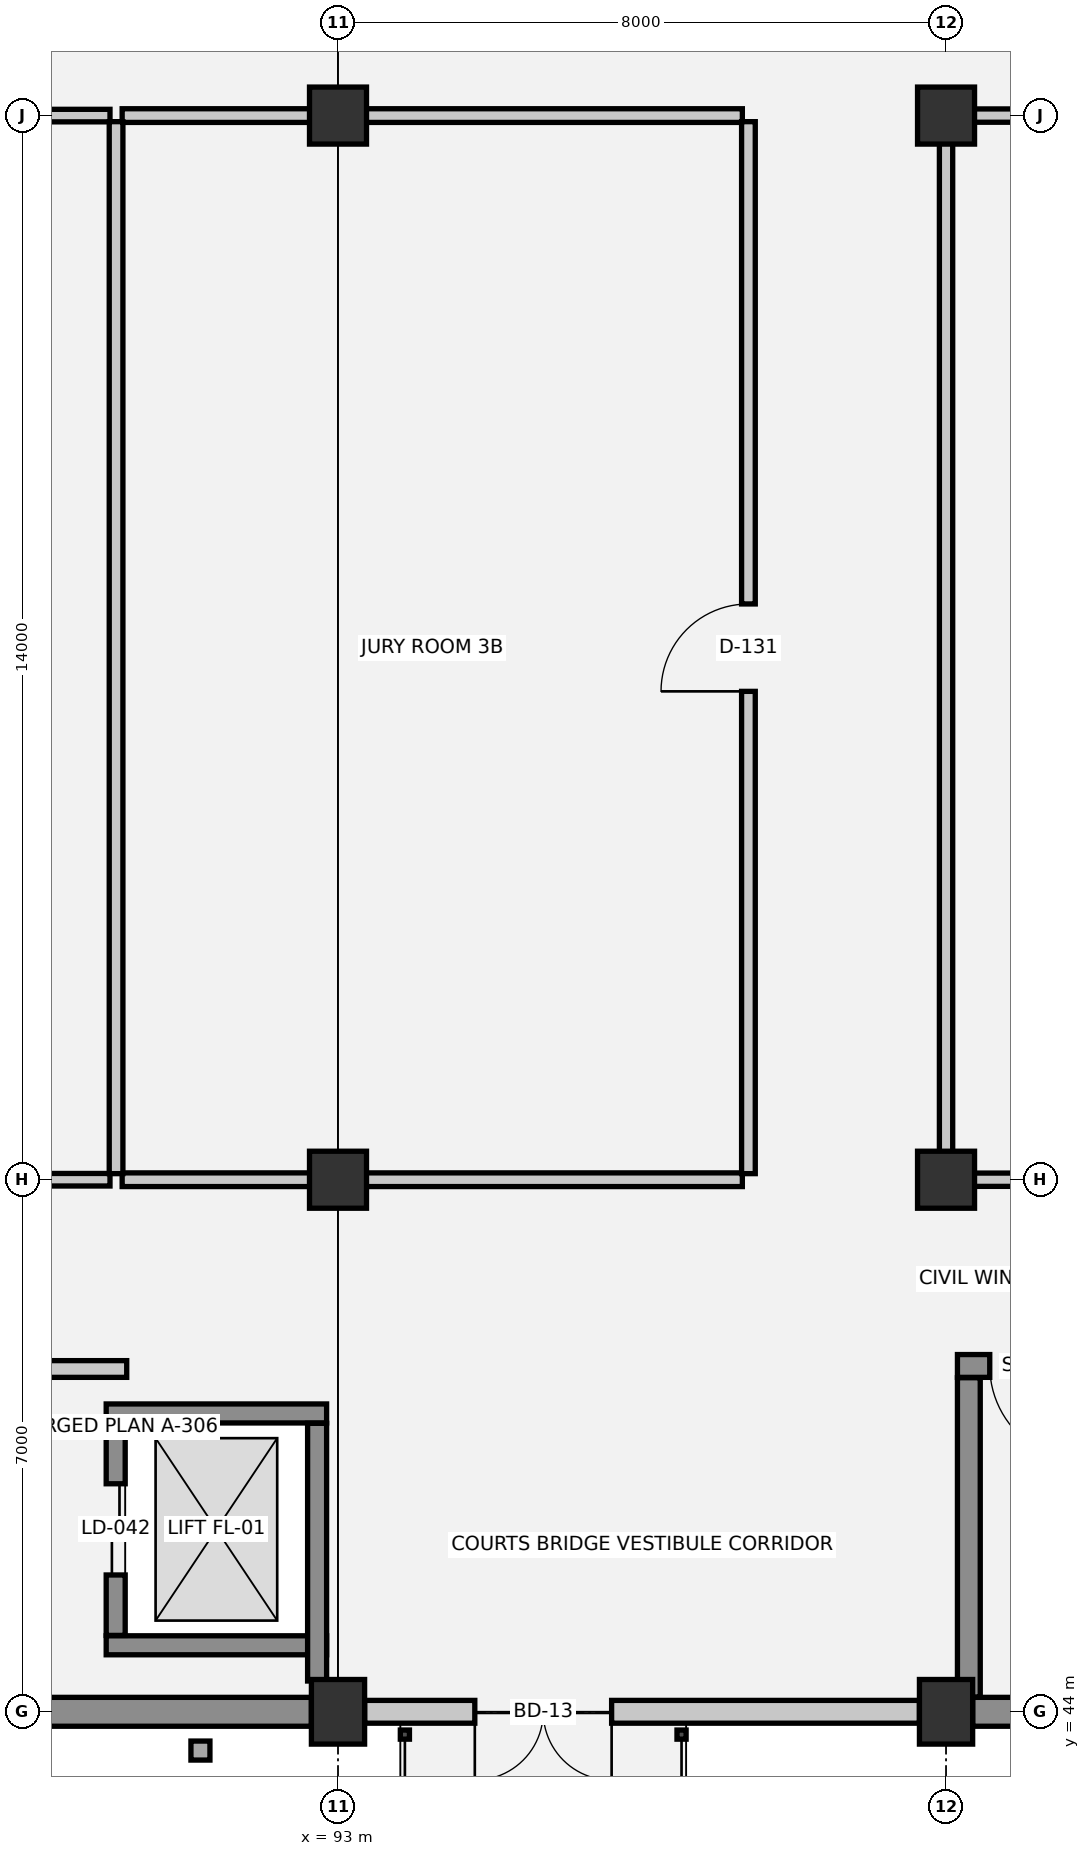
"""IFC4 building model, lengths in metres.
Left out: names, types, materials, properties, quantities, classifications, styles, units other than length and angle.
Written with IfcOpenShell. Run it as: python <this file> out.ifc"""

import sys

from ifc_helpers import new_model, si_unit, direction, frame, frame_2d, origin, origin_2d, place, context, subcontext, project, spatial, rectangle, extrude, element, fill, save


model = new_model("IFC4")
c1 = context("Model", 3, precision=1e-05, world=origin(), true_north=direction((0.0, 1.0)))
c2 = subcontext(c1, "Body", "Model", "MODEL_VIEW")
j1 = project(units=[si_unit("LENGTHUNIT", "METRE"), si_unit("PLANEANGLEUNIT", "RADIAN")], contexts=[c1])
p1 = place(None, origin())
s1 = spatial("IfcSite", under=j1, at=p1, CompositionType="ELEMENT")
p2 = place(p1, origin())
s2 = spatial("IfcBuilding", under=s1, at=p2, CompositionType="ELEMENT")
p3 = place(p2, frame((0.0, 0.0, 9.9)))
s3 = spatial("IfcBuildingStorey", under=s2, at=p3, CompositionType="ELEMENT", Elevation=9.9)
p4 = place(p3, frame((93.0, 44.0, 0.0), z_axis=(0.0, 0.0, 1.0), x_axis=(1.0, 0.0, 0.0)))
e1 = element("IfcColumn", 1, at=p4, inside=s3, PredefinedType="COLUMN", context=c2, shape_type="SweptSolid", body=[
    extrude(rectangle(XDim=0.7, YDim=0.85, at=origin_2d()), origin(), (0.0, 0.0, 1.0), 4.5),
])
for number, where, z_axis, x_axis in (
    (2, (93.0, 51.0, 0.0), (0.0, 0.0, 1.0), (1.0, 0.0, 0.0)),
    (3, (93.0, 65.0, 0.0), (0.0, 0.0, 1.0), (1.0, 0.0, 0.0)),
):
    element("IfcColumn", number, at=place(p3, frame(where, z_axis=z_axis, x_axis=x_axis)), inside=s3, PredefinedType="COLUMN", context=c2, shape_type="SweptSolid", body=[
        extrude(rectangle(XDim=0.75, YDim=0.75, at=origin_2d()), origin(), (0.0, 0.0, 1.0), 4.5),
    ])
p5 = place(p3, frame((101.0, 44.0, 0.0), z_axis=(0.0, 0.0, 1.0), x_axis=(1.0, 0.0, 0.0)))
e4 = element("IfcColumn", 4, at=p5, inside=s3, PredefinedType="COLUMN", context=c2, shape_type="SweptSolid", body=[
    extrude(rectangle(XDim=0.7, YDim=0.85, at=origin_2d()), origin(), (0.0, 0.0, 1.0), 4.5),
])
for number, where, z_axis, x_axis in (
    (5, (101.0, 51.0, 0.0), (0.0, 0.0, 1.0), (1.0, 0.0, 0.0)),
    (6, (101.0, 65.0, 0.0), (0.0, 0.0, 1.0), (1.0, 0.0, 0.0)),
):
    element("IfcColumn", number, at=place(p3, frame(where, z_axis=z_axis, x_axis=x_axis)), inside=s3, PredefinedType="COLUMN", context=c2, shape_type="SweptSolid", body=[
        extrude(rectangle(XDim=0.75, YDim=0.75, at=origin_2d()), origin(), (0.0, 0.0, 1.0), 4.5),
    ])
p6 = place(p3, frame((108.65, 44.0, 0.0), z_axis=(0.0, 0.0, 1.0), x_axis=(-1.0, 0.0, 0.0)))
e7 = element("IfcWall", 7, at=p6, inside=s3, PredefinedType="STANDARD", context=c2, shape_type="SweptSolid", body=[
    extrude(rectangle(XDim=7.3, YDim=0.38, at=frame_2d((3.65, 0.0))), origin(), (0.0, 0.0, 1.0), 3.23),
])
p7 = place(p6, frame((3.0, 0.0, 0.95)))
e8 = element("IfcOpeningElement", 8, at=p7, cuts=e7, PredefinedType="OPENING", context=c2, shape_type="SweptSolid", body=[
    extrude(rectangle(XDim=1.3, YDim=1.7, at=frame_2d((0.65, 0.85))), frame((0.0, 0.2, 0.0), z_axis=(0.0, -1.0, 0.0), x_axis=(1.0, 0.0, 0.0)), (0.0, 0.0, 1.0), 0.4),
])
p8 = place(p3, frame((100.65, 44.0, 0.0), z_axis=(0.0, 0.0, 1.0), x_axis=(-1.0, 0.0, 0.0)))
e9 = element("IfcWall", 9, at=p8, inside=s3, PredefinedType="SOLIDWALL", context=c2, shape_type="SweptSolid", body=[
    extrude(rectangle(XDim=7.3, YDim=0.3, at=frame_2d((3.65, 0.0))), origin(), (0.0, 0.0, 1.0), 3.23),
])
p9 = place(p8, frame((4.05, 0.0, 0.0)))
e10 = element("IfcOpeningElement", 10, at=p9, cuts=e9, PredefinedType="OPENING", context=c2, shape_type="SweptSolid", body=[
    extrude(rectangle(XDim=1.8, YDim=2.25, at=frame_2d((0.9, 1.125))), frame((0.0, 0.16, 0.0), z_axis=(0.0, -1.0, 0.0), x_axis=(1.0, 0.0, 0.0)), (0.0, 0.0, 1.0), 0.32),
])
p10 = place(p3, frame((92.65, 44.0, 0.0), z_axis=(0.0, 0.0, 1.0), x_axis=(-1.0, 0.0, 0.0)))
e11 = element("IfcWall", 11, at=p10, inside=s3, PredefinedType="STANDARD", context=c2, shape_type="SweptSolid", body=[
    extrude(rectangle(XDim=7.3, YDim=0.38, at=frame_2d((3.65, 0.0))), origin(), (0.0, 0.0, 1.0), 3.23),
])
for number, where, z_axis, x_axis in (
    (12, (89.95, 44.875, 0.0), (0.0, 0.0, 1.0), (1.0, 0.0, 0.0)),
    (13, (92.85, 47.925, 0.0), (0.0, 0.0, 1.0), (-1.0, 0.0, 0.0)),
):
    element("IfcWall", number, at=place(p3, frame(where, z_axis=z_axis, x_axis=x_axis)), inside=s3, PredefinedType="SHEAR", context=c2, shape_type="SweptSolid", body=[
        extrude(rectangle(XDim=2.9, YDim=0.25, at=frame_2d((1.45, 0.0))), origin(), (0.0, 0.0, 1.0), 4.5),
    ])
p11 = place(p3, frame((90.075, 47.795, 0.0), z_axis=(0.0, 0.0, 1.0), x_axis=(0.0, -1.0, 0.0)))
e14 = element("IfcWall", 14, at=p11, inside=s3, PredefinedType="SHEAR", context=c2, shape_type="SweptSolid", body=[
    extrude(rectangle(XDim=2.79, YDim=0.25, at=frame_2d((1.395, 0.0))), origin(), (0.0, 0.0, 1.0), 4.5),
])
p12 = place(p11, frame((0.795, 0.0, 0.0)))
e15 = element("IfcOpeningElement", 15, at=p12, cuts=e14, PredefinedType="OPENING", context=c2, shape_type="SweptSolid", body=[
    extrude(rectangle(XDim=1.2, YDim=2.2, at=frame_2d((0.6, 1.1))), frame((0.0, 0.135, 0.0), z_axis=(0.0, -1.0, 0.0), x_axis=(1.0, 0.0, 0.0)), (0.0, 0.0, 1.0), 0.27),
])
p13 = place(p3, frame((92.725, 44.405, 0.0), z_axis=(0.0, 0.0, 1.0), x_axis=(0.0, 1.0, 0.0)))
e16 = element("IfcWall", 16, at=p13, inside=s3, PredefinedType="SHEAR", context=c2, shape_type="SweptSolid", body=[
    extrude(rectangle(XDim=3.39, YDim=0.25, at=frame_2d((1.695, 0.0))), origin(), (0.0, 0.0, 1.0), 4.5),
])
p14 = place(p3, frame((108.85, 48.55, 0.0), z_axis=(0.0, 0.0, 1.0), x_axis=(-1.0, 0.0, 0.0)))
e17 = element("IfcWall", 17, at=p14, inside=s3, PredefinedType="SHEAR", context=c2, shape_type="SweptSolid", body=[
    extrude(rectangle(XDim=7.7, YDim=0.3, at=frame_2d((3.85, 0.0))), origin(), (0.0, 0.0, 1.0), 4.2),
])
p15 = place(p14, frame((6.025, 0.0, 0.0)))
e18 = element("IfcOpeningElement", 18, at=p15, cuts=e17, PredefinedType="OPENING", context=c2, shape_type="SweptSolid", body=[
    extrude(rectangle(XDim=1.25, YDim=2.15, at=frame_2d((0.625, 1.075))), frame((0.0, 0.16, 0.0), z_axis=(0.0, -1.0, 0.0), x_axis=(1.0, 0.0, 0.0)), (0.0, 0.0, 1.0), 0.32),
])
p16 = place(p3, frame((101.3, 48.395, 0.0), z_axis=(0.0, 0.0, 1.0), x_axis=(0.0, -1.0, 0.0)))
e19 = element("IfcWall", 19, at=p16, inside=s3, PredefinedType="SHEAR", context=c2, shape_type="SweptSolid", body=[
    extrude(rectangle(XDim=4.2, YDim=0.3, at=frame_2d((2.1, 0.0))), origin(), (0.0, 0.0, 1.0), 4.2),
])
p17 = place(p3, frame((85.18, 48.51, 0.0), z_axis=(0.0, 0.0, 1.0), x_axis=(1.0, 0.0, 0.0)))
e20 = element("IfcWall", 20, at=p17, inside=s3, PredefinedType="SOLIDWALL", context=c2, shape_type="SweptSolid", body=[
    extrude(rectangle(XDim=5.04, YDim=0.22, at=frame_2d((2.52, 0.0))), origin(), (0.0, 0.0, 1.0), 4.2),
])
p18 = place(p17, frame((1.87, 0.0, 0.0)))
e21 = element("IfcOpeningElement", 21, at=p18, cuts=e20, PredefinedType="OPENING", context=c2, shape_type="SweptSolid", body=[
    extrude(rectangle(XDim=1.3, YDim=2.15, at=frame_2d((0.65, 1.075))), frame((0.0, 0.12, 0.0), z_axis=(0.0, -1.0, 0.0), x_axis=(1.0, 0.0, 0.0)), (0.0, 0.0, 1.0), 0.24),
])
p19 = place(p3, frame((82.4, 51.0, 0.0), z_axis=(0.0, 0.0, 1.0), x_axis=(1.0, 0.0, 0.0)))
e22 = element("IfcWall", 22, at=p19, inside=s3, PredefinedType="PARTITIONING", context=c2, shape_type="SweptSolid", body=[
    extrude(rectangle(XDim=7.6, YDim=0.165, at=frame_2d((3.8, 0.0))), origin(), (0.0, 0.0, 1.0), 3.4),
])
p20 = place(p3, frame((90.16, 51.0, 0.0), z_axis=(0.0, 0.0, 1.0), x_axis=(1.0, 0.0, 0.0)))
e23 = element("IfcWall", 23, at=p20, inside=s3, PredefinedType="PARTITIONING", context=c2, shape_type="SweptSolid", body=[
    extrude(rectangle(XDim=8.16, YDim=0.18, at=frame_2d((4.08, 0.0))), origin(), (0.0, 0.0, 1.0), 3.4),
])
p21 = place(p3, frame((101.08, 51.0, 0.0), z_axis=(0.0, 0.0, 1.0), x_axis=(1.0, 0.0, 0.0)))
e24 = element("IfcWall", 24, at=p21, inside=s3, PredefinedType="PARTITIONING", context=c2, shape_type="SweptSolid", body=[
    extrude(rectangle(XDim=22.84, YDim=0.175, at=frame_2d((11.42, 0.0))), origin(), (0.0, 0.0, 1.0), 3.4),
])
p22 = place(p21, frame((10.52, 0.0, 0.0)))
e25 = element("IfcOpeningElement", 25, at=p22, cuts=e24, PredefinedType="OPENING", context=c2, shape_type="SweptSolid", body=[
    extrude(rectangle(XDim=1.8, YDim=2.3, at=frame_2d((0.9, 1.15))), frame((0.0, 0.097, 0.0), z_axis=(0.0, -1.0, 0.0), x_axis=(1.0, 0.0, 0.0)), (0.0, 0.0, 1.0), 0.195),
])
p23 = place(p3, frame((74.56, 65.0, 0.0), z_axis=(0.0, 0.0, 1.0), x_axis=(1.0, 0.0, 0.0)))
e26 = element("IfcWall", 26, at=p23, inside=s3, PredefinedType="PARTITIONING", context=c2, shape_type="SweptSolid", body=[
    extrude(rectangle(XDim=15.44, YDim=0.165, at=frame_2d((7.72, 0.0))), origin(), (0.0, 0.0, 1.0), 3.4),
])
p24 = place(p23, frame((6.82, 0.0, 0.0)))
e27 = element("IfcOpeningElement", 27, at=p24, cuts=e26, PredefinedType="OPENING", context=c2, shape_type="SweptSolid", body=[
    extrude(rectangle(XDim=1.8, YDim=2.3, at=frame_2d((0.9, 1.15))), frame((0.0, 0.093, 0.0), z_axis=(0.0, -1.0, 0.0), x_axis=(1.0, 0.0, 0.0)), (0.0, 0.0, 1.0), 0.185),
])
p25 = place(p3, frame((90.16, 65.0, 0.0), z_axis=(0.0, 0.0, 1.0), x_axis=(1.0, 0.0, 0.0)))
e28 = element("IfcWall", 28, at=p25, inside=s3, PredefinedType="PARTITIONING", context=c2, shape_type="SweptSolid", body=[
    extrude(rectangle(XDim=8.16, YDim=0.18, at=frame_2d((4.08, 0.0))), origin(), (0.0, 0.0, 1.0), 3.4),
])
p26 = place(p3, frame((101.08, 65.0, 0.0), z_axis=(0.0, 0.0, 1.0), x_axis=(1.0, 0.0, 0.0)))
e29 = element("IfcWall", 29, at=p26, inside=s3, PredefinedType="PARTITIONING", context=c2, shape_type="SweptSolid", body=[
    extrude(rectangle(XDim=22.84, YDim=0.175, at=frame_2d((11.42, 0.0))), origin(), (0.0, 0.0, 1.0), 3.4),
])
p27 = place(p3, frame((90.08, 51.08, 0.0), z_axis=(0.0, 0.0, 1.0), x_axis=(0.0, 1.0, 0.0)))
e30 = element("IfcWall", 30, at=p27, inside=s3, PredefinedType="PARTITIONING", context=c2, shape_type="SweptSolid", body=[
    extrude(rectangle(XDim=13.84, YDim=0.18, at=frame_2d((6.92, 0.0))), origin(), (0.0, 0.0, 1.0), 4.14),
])
p28 = place(p3, frame((98.4, 51.08, 0.0), z_axis=(0.0, 0.0, 1.0), x_axis=(0.0, 1.0, 0.0)))
e31 = element("IfcWall", 31, at=p28, inside=s3, PredefinedType="PARTITIONING", context=c2, shape_type="SweptSolid", body=[
    extrude(rectangle(XDim=13.84, YDim=0.18, at=frame_2d((6.92, 0.0))), origin(), (0.0, 0.0, 1.0), 4.14),
])
p29 = place(p28, frame((6.345, 0.0, 0.0)))
e32 = element("IfcOpeningElement", 32, at=p29, cuts=e31, PredefinedType="OPENING", context=c2, shape_type="SweptSolid", body=[
    extrude(rectangle(XDim=1.15, YDim=2.2, at=frame_2d((0.575, 1.1))), frame((0.0, 0.1, 0.0), z_axis=(0.0, -1.0, 0.0), x_axis=(1.0, 0.0, 0.0)), (0.0, 0.0, 1.0), 0.2),
])
p30 = place(p3, frame((101.0, 51.08, 0.0), z_axis=(0.0, 0.0, 1.0), x_axis=(0.0, 1.0, 0.0)))
e33 = element("IfcWall", 33, at=p30, inside=s3, PredefinedType="PARTITIONING", context=c2, shape_type="SweptSolid", body=[
    extrude(rectangle(XDim=13.84, YDim=0.175, at=frame_2d((6.92, 0.0))), origin(), (0.0, 0.0, 1.0), 3.25),
])
p31 = place(p9, origin())
e34 = element("IfcDoor", 34, at=p31, inside=s3, OperationType="DOUBLE_DOOR_SINGLE_SWING", PredefinedType="DOOR", context=c2, shape_type="SweptSolid", body=[
    extrude(rectangle(XDim=1.8, YDim=2.25, at=frame_2d((0.9, 1.125))), frame((0.0, 0.025, 0.0), z_axis=(0.0, -1.0, 0.0), x_axis=(1.0, 0.0, 0.0)), (0.0, 0.0, 1.0), 0.05),
])
fill(e10, e34)
p32 = place(p12, origin())
e35 = element("IfcDoor", 35, at=p32, inside=s3, OperationType="DOUBLE_DOOR_SLIDING", PredefinedType="DOOR", context=c2, shape_type="SweptSolid", body=[
    extrude(rectangle(XDim=1.2, YDim=2.2, at=frame_2d((0.6, 1.1))), frame((0.0, 0.025, 0.0), z_axis=(0.0, -1.0, 0.0), x_axis=(1.0, 0.0, 0.0)), (0.0, 0.0, 1.0), 0.05),
])
fill(e15, e35)
p33 = place(p15, origin())
e36 = element("IfcDoor", 36, at=p33, inside=s3, OperationType="SINGLE_SWING_LEFT", PredefinedType="DOOR", context=c2, shape_type="SweptSolid", body=[
    extrude(rectangle(XDim=1.25, YDim=2.15, at=frame_2d((0.625, 1.075))), frame((0.0, 0.025, 0.0), z_axis=(0.0, -1.0, 0.0), x_axis=(1.0, 0.0, 0.0)), (0.0, 0.0, 1.0), 0.05),
])
fill(e18, e36)
p34 = place(p29, origin())
e37 = element("IfcDoor", 37, at=p34, inside=s3, OperationType="SINGLE_SWING_LEFT", PredefinedType="DOOR", context=c2, shape_type="SweptSolid", body=[
    extrude(rectangle(XDim=1.15, YDim=2.2, at=frame_2d((0.575, 1.1))), frame((0.0, 0.025, 0.0), z_axis=(0.0, -1.0, 0.0), x_axis=(1.0, 0.0, 0.0)), (0.0, 0.0, 1.0), 0.05),
])
fill(e32, e37)
save(model, sys.argv[1])
